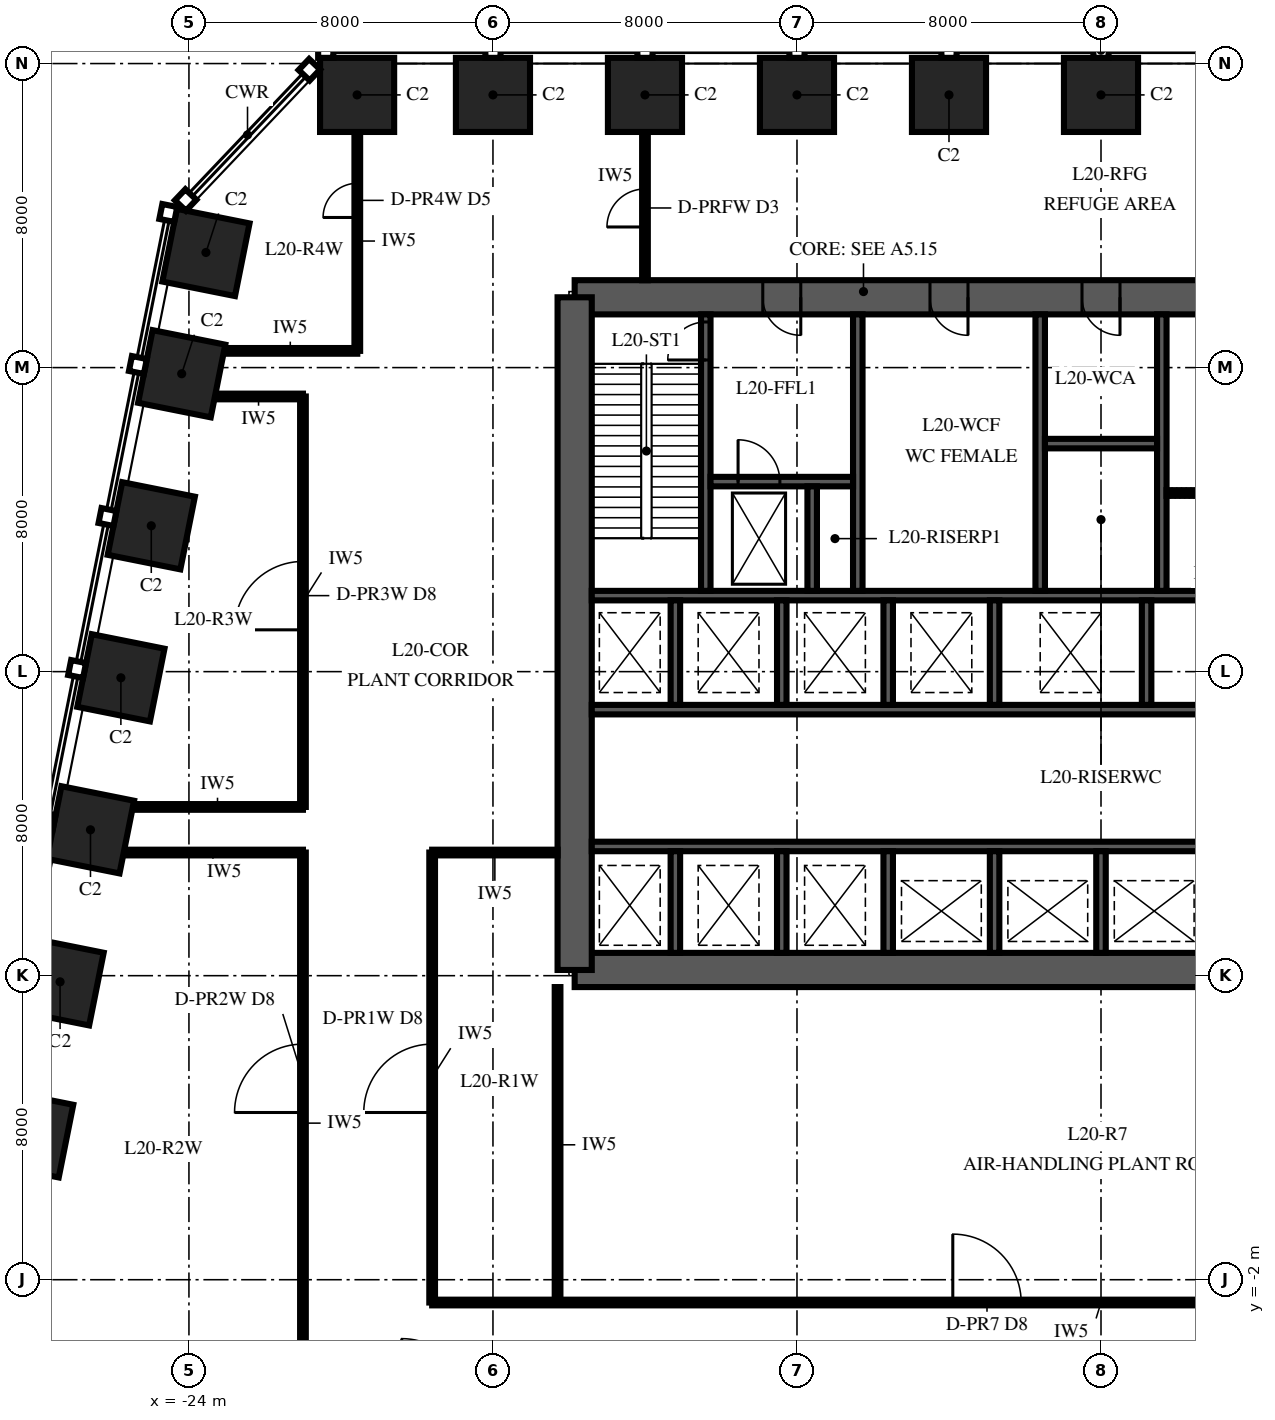
"""IFC4 building model, lengths in metres.
Left out: names, types, materials, properties, quantities, classifications, styles, units other than length and angle.
Written with IfcOpenShell. Run it as: python <this file> out.ifc"""

import sys

from ifc_helpers import new_model, si_unit, direction, frame, frame_2d, origin, origin_2d, place, context, subcontext, project, spatial, polyline, rectangle, outline, extrude, element, fill, save


model = new_model("IFC4")
c1 = context("Model", 3, precision=1e-05, world=origin(), true_north=direction((0.0, 1.0)))
c2 = subcontext(c1, "Body", "Model", "MODEL_VIEW")
j1 = project(units=[si_unit("LENGTHUNIT", "METRE"), si_unit("PLANEANGLEUNIT", "RADIAN")], contexts=[c1])
p1 = place(None, origin())
s1 = spatial("IfcSite", under=j1, at=p1, CompositionType="ELEMENT")
p2 = place(p1, origin())
s2 = spatial("IfcBuilding", under=s1, at=p2, CompositionType="ELEMENT")
p3 = place(p2, frame((0.0, 0.0, 92.0)))
s3 = spatial("IfcBuildingStorey", under=s2, at=p3, CompositionType="ELEMENT", Elevation=92.0)
for number, where, z_axis, x_axis in (
    (1, (0.0, 29.175, 0.0), (0.0, 0.0, 1.0), (-1.0, 0.0, 0.0)),
    (2, (-4.0, 29.175, 0.0), (0.0, 0.0, 1.0), (-1.0, 0.0, 0.0)),
    (3, (-8.0, 29.175, 0.0), (0.0, 0.0, 1.0), (-1.0, 0.0, 0.0)),
    (4, (-12.0, 29.175, 0.0), (0.0, 0.0, 1.0), (-1.0, 0.0, 0.0)),
    (5, (-16.0, 29.175, 0.0), (0.0, 0.0, 1.0), (-1.0, 0.0, 0.0)),
    (6, (-19.575, 29.175, 0.0), (0.0, 0.0, 1.0), (-1.0, 0.0, 0.0)),
    (7, (-23.553, 25.029, 0.0), (0.0, 0.0, 1.0), (-0.196, -0.981, 0.0)),
    (8, (-24.191, 21.838, 0.0), (0.0, 0.0, 1.0), (-0.196, -0.981, 0.0)),
    (9, (-24.991, 17.838, 0.0), (0.0, 0.0, 1.0), (-0.196, -0.981, 0.0)),
    (10, (-25.791, 13.838, 0.0), (0.0, 0.0, 1.0), (-0.196, -0.981, 0.0)),
    (11, (-26.591, 9.838, 0.0), (0.0, 0.0, 1.0), (-0.196, -0.981, 0.0)),
    (12, (-27.391, 5.838, 0.0), (0.0, 0.0, 1.0), (-0.196, -0.981, 0.0)),
    (13, (-28.191, 1.838, 0.0), (0.0, 0.0, 1.0), (-0.196, -0.981, 0.0)),
):
    element("IfcColumn", number, at=place(p3, frame(where, z_axis=z_axis, x_axis=x_axis)), inside=s3, PredefinedType="COLUMN", context=c2, shape_type="SweptSolid", body=[
        extrude(rectangle(XDim=1.95, YDim=1.95, at=origin_2d()), origin(), (0.0, 0.0, 1.0), 6.0),
    ])
p4 = place(p3, frame((-13.85, 6.15, 0.0), z_axis=(0.0, 0.0, 1.0), x_axis=(1.0, 0.0, 0.0)))
e14 = element("IfcWall", 14, at=p4, inside=s3, PredefinedType="SHEAR", context=c2, shape_type="SweptSolid", body=[
    extrude(rectangle(XDim=27.7, YDim=0.9, at=frame_2d((13.85, 0.0))), origin(), (0.0, 0.0, 1.0), 6.0),
])
p5 = place(p3, frame((13.85, 23.85, 0.0), z_axis=(0.0, 0.0, 1.0), x_axis=(-1.0, 0.0, 0.0)))
e15 = element("IfcWall", 15, at=p5, inside=s3, PredefinedType="SHEAR", context=c2, shape_type="SweptSolid", body=[
    extrude(rectangle(XDim=27.7, YDim=0.9, at=frame_2d((13.85, 0.0))), origin(), (0.0, 0.0, 1.0), 6.0),
])
p6 = place(p5, frame((21.75, 0.0, 0.0)))
e16 = element("IfcOpeningElement", 16, at=p6, cuts=e15, PredefinedType="OPENING", context=c2, shape_type="SweptSolid", body=[
    extrude(rectangle(XDim=1.0, YDim=2.1, at=frame_2d((0.5, 1.05))), frame((0.0, 0.465, 0.0), z_axis=(0.0, -1.0, 0.0), x_axis=(1.0, 0.0, 0.0)), (0.0, 0.0, 1.0), 0.93),
])
p7 = place(p5, frame((4.95, 0.0, 0.0)))
e17 = element("IfcOpeningElement", 17, at=p7, cuts=e15, PredefinedType="OPENING", context=c2, shape_type="SweptSolid", body=[
    extrude(rectangle(XDim=1.0, YDim=2.1, at=frame_2d((0.5, 1.05))), frame((0.0, 0.465, 0.0), z_axis=(0.0, -1.0, 0.0), x_axis=(1.0, 0.0, 0.0)), (0.0, 0.0, 1.0), 0.93),
])
p8 = place(p5, frame((17.35, 0.0, 0.0)))
e18 = element("IfcOpeningElement", 18, at=p8, cuts=e15, PredefinedType="OPENING", context=c2, shape_type="SweptSolid", body=[
    extrude(rectangle(XDim=1.0, YDim=2.1, at=frame_2d((0.5, 1.05))), frame((0.0, 0.465, 0.0), z_axis=(0.0, -1.0, 0.0), x_axis=(1.0, 0.0, 0.0)), (0.0, 0.0, 1.0), 0.93),
])
p9 = place(p5, frame((13.35, 0.0, 0.0)))
e19 = element("IfcOpeningElement", 19, at=p9, cuts=e15, PredefinedType="OPENING", context=c2, shape_type="SweptSolid", body=[
    extrude(rectangle(XDim=1.0, YDim=2.1, at=frame_2d((0.5, 1.05))), frame((0.0, 0.465, 0.0), z_axis=(0.0, -1.0, 0.0), x_axis=(1.0, 0.0, 0.0)), (0.0, 0.0, 1.0), 0.93),
])
p10 = place(p5, frame((9.35, 0.0, 0.0)))
e20 = element("IfcOpeningElement", 20, at=p10, cuts=e15, PredefinedType="OPENING", context=c2, shape_type="SweptSolid", body=[
    extrude(rectangle(XDim=1.0, YDim=2.1, at=frame_2d((0.5, 1.05))), frame((0.0, 0.465, 0.0), z_axis=(0.0, -1.0, 0.0), x_axis=(1.0, 0.0, 0.0)), (0.0, 0.0, 1.0), 0.93),
])
p11 = place(p3, frame((-13.85, 23.85, 0.0), z_axis=(0.0, 0.0, 1.0), x_axis=(0.0, -1.0, 0.0)))
e21 = element("IfcWall", 21, at=p11, inside=s3, PredefinedType="SHEAR", context=c2, shape_type="SweptSolid", body=[
    extrude(outline(polyline([(0.0, -0.45), (17.7, -0.45), (17.7, 0.0), (17.25, 0.0), (17.25, 0.45), (0.45, 0.45), (0.45, 0.0), (0.0, 0.0), (0.0, -0.45)])), origin(), (0.0, 0.0, 1.0), 6.0),
])
for number, where, z_axis, x_axis in (
    (22, (-13.4, 9.4, 0.0), (0.0, 0.0, 1.0), (1.0, 0.0, 0.0)),
    (23, (-13.4, 13.0, 0.0), (0.0, 0.0, 1.0), (1.0, 0.0, 0.0)),
    (24, (-13.4, 16.0, 0.0), (0.0, 0.0, 1.0), (1.0, 0.0, 0.0)),
):
    element("IfcWall", number, at=place(p3, frame(where, z_axis=z_axis, x_axis=x_axis)), inside=s3, PredefinedType="SHEAR", context=c2, shape_type="SweptSolid", body=[
        extrude(rectangle(XDim=26.8, YDim=0.25, at=frame_2d((13.4, 0.0))), origin(), (0.0, 0.0, 1.0), 6.0),
    ])
for number, where, z_axis, x_axis in (
    (25, (-11.2, 6.6, 0.0), (0.0, 0.0, 1.0), (0.0, 1.0, 0.0)),
    (26, (-8.4, 6.6, 0.0), (0.0, 0.0, 1.0), (0.0, 1.0, 0.0)),
    (27, (-5.6, 6.6, 0.0), (0.0, 0.0, 1.0), (0.0, 1.0, 0.0)),
    (28, (-2.8, 6.6, 0.0), (0.0, 0.0, 1.0), (0.0, 1.0, 0.0)),
    (29, (0.0, 6.6, 0.0), (0.0, 0.0, 1.0), (0.0, 1.0, 0.0)),
):
    element("IfcWall", number, at=place(p3, frame(where, z_axis=z_axis, x_axis=x_axis)), inside=s3, PredefinedType="SHEAR", context=c2, shape_type="SweptSolid", body=[
        extrude(rectangle(XDim=2.675, YDim=0.25, at=frame_2d((1.337, 0.0))), origin(), (0.0, 0.0, 1.0), 6.0),
    ])
for number, where, z_axis, x_axis in (
    (30, (-11.2, 13.125, 0.0), (0.0, 0.0, 1.0), (0.0, 1.0, 0.0)),
    (31, (-8.4, 13.125, 0.0), (0.0, 0.0, 1.0), (0.0, 1.0, 0.0)),
    (32, (-5.6, 13.125, 0.0), (0.0, 0.0, 1.0), (0.0, 1.0, 0.0)),
    (33, (-2.8, 13.125, 0.0), (0.0, 0.0, 1.0), (0.0, 1.0, 0.0)),
    (34, (1.2, 13.125, 0.0), (0.0, 0.0, 1.0), (0.0, 1.0, 0.0)),
):
    element("IfcWall", number, at=place(p3, frame(where, z_axis=z_axis, x_axis=x_axis)), inside=s3, PredefinedType="SHEAR", context=c2, shape_type="SweptSolid", body=[
        extrude(rectangle(XDim=2.75, YDim=0.25, at=frame_2d((1.375, 0.0))), origin(), (0.0, 0.0, 1.0), 6.0),
    ])
p12 = place(p3, frame((-10.4, 16.125, 0.0), z_axis=(0.0, 0.0, 1.0), x_axis=(0.0, 1.0, 0.0)))
e35 = element("IfcWall", 35, at=p12, inside=s3, PredefinedType="SHEAR", context=c2, shape_type="SweptSolid", body=[
    extrude(rectangle(XDim=7.275, YDim=0.25, at=frame_2d((3.637, 0.0))), origin(), (0.0, 0.0, 1.0), 6.0),
])
p13 = place(p12, frame((6.075, 0.0, 0.0)))
e36 = element("IfcOpeningElement", 36, at=p13, cuts=e35, PredefinedType="OPENING", context=c2, shape_type="SweptSolid", body=[
    extrude(rectangle(XDim=1.0, YDim=2.1, at=frame_2d((0.5, 1.05))), frame((0.0, 0.14, 0.0), z_axis=(0.0, -1.0, 0.0), x_axis=(1.0, 0.0, 0.0)), (0.0, 0.0, 1.0), 0.28),
])
for number, where, z_axis, x_axis in (
    (37, (-6.4, 16.125, 0.0), (0.0, 0.0, 1.0), (0.0, 1.0, 0.0)),
    (38, (-1.6, 16.125, 0.0), (0.0, 0.0, 1.0), (0.0, 1.0, 0.0)),
    (39, (1.6, 16.125, 0.0), (0.0, 0.0, 1.0), (0.0, 1.0, 0.0)),
):
    element("IfcWall", number, at=place(p3, frame(where, z_axis=z_axis, x_axis=x_axis)), inside=s3, PredefinedType="SHEAR", context=c2, shape_type="SweptSolid", body=[
        extrude(rectangle(XDim=7.275, YDim=0.25, at=frame_2d((3.637, 0.0))), origin(), (0.0, 0.0, 1.0), 6.0),
    ])
p14 = place(p3, frame((-10.275, 19.0, 0.0), z_axis=(0.0, 0.0, 1.0), x_axis=(1.0, 0.0, 0.0)))
e40 = element("IfcWall", 40, at=p14, inside=s3, PredefinedType="SHEAR", context=c2, shape_type="SweptSolid", body=[
    extrude(rectangle(XDim=3.75, YDim=0.25, at=frame_2d((1.875, 0.0))), origin(), (0.0, 0.0, 1.0), 6.0),
])
p15 = place(p14, frame((0.725, 0.0, 0.0)))
e41 = element("IfcOpeningElement", 41, at=p15, cuts=e40, PredefinedType="OPENING", context=c2, shape_type="SweptSolid", body=[
    extrude(rectangle(XDim=1.1, YDim=2.1, at=frame_2d((0.55, 1.05))), frame((0.0, 0.14, 0.0), z_axis=(0.0, -1.0, 0.0), x_axis=(1.0, 0.0, 0.0)), (0.0, 0.0, 1.0), 0.28),
])
p16 = place(p3, frame((-7.6, 16.125, 0.0), z_axis=(0.0, 0.0, 1.0), x_axis=(0.0, 1.0, 0.0)))
e42 = element("IfcWall", 42, at=p16, inside=s3, PredefinedType="SHEAR", context=c2, shape_type="SweptSolid", body=[
    extrude(rectangle(XDim=2.75, YDim=0.25, at=frame_2d((1.375, 0.0))), origin(), (0.0, 0.0, 1.0), 6.0),
])
p17 = place(p3, frame((-1.475, 20.0, 0.0), z_axis=(0.0, 0.0, 1.0), x_axis=(1.0, 0.0, 0.0)))
e43 = element("IfcWall", 43, at=p17, inside=s3, PredefinedType="SHEAR", context=c2, shape_type="SweptSolid", body=[
    extrude(rectangle(XDim=2.95, YDim=0.25, at=frame_2d((1.475, 0.0))), origin(), (0.0, 0.0, 1.0), 6.0),
])
p18 = place(p3, frame((1.725, 18.7, 0.0), z_axis=(0.0, 0.0, 1.0), x_axis=(1.0, 0.0, 0.0)))
e44 = element("IfcWall", 44, at=p18, inside=s3, PredefinedType="PARTITIONING", context=c2, shape_type="SweptSolid", body=[
    extrude(rectangle(XDim=4.55, YDim=0.15, at=frame_2d((2.275, 0.0))), origin(), (0.0, 0.0, 1.0), 5.85),
])
p19 = place(p18, frame((1.825, 0.0, 0.0)))
e45 = element("IfcOpeningElement", 45, at=p19, cuts=e44, PredefinedType="OPENING", context=c2, shape_type="SweptSolid", body=[
    extrude(rectangle(XDim=0.9, YDim=2.1, at=frame_2d((0.45, 1.05))), frame((0.0, 0.09, 0.0), z_axis=(0.0, -1.0, 0.0), x_axis=(1.0, 0.0, 0.0)), (0.0, 0.0, 1.0), 0.18),
])
p20 = place(p3, frame((-17.6, -2.6, 0.0), z_axis=(0.0, 0.0, 1.0), x_axis=(0.0, 1.0, 0.0)))
e46 = element("IfcWall", 46, at=p20, inside=s3, PredefinedType="PARTITIONING", context=c2, shape_type="SweptSolid", body=[
    extrude(rectangle(XDim=11.84, YDim=0.15, at=frame_2d((5.92, 0.0))), origin(), (0.0, 0.0, 1.0), 5.8),
])
p21 = place(p20, frame((5.0, 0.0, 0.0)))
e47 = element("IfcOpeningElement", 47, at=p21, cuts=e46, PredefinedType="OPENING", context=c2, shape_type="SweptSolid", body=[
    extrude(rectangle(XDim=1.8, YDim=2.4, at=frame_2d((0.9, 1.2))), frame((0.0, 0.09, 0.0), z_axis=(0.0, -1.0, 0.0), x_axis=(1.0, 0.0, 0.0)), (0.0, 0.0, 1.0), 0.18),
])
p22 = place(p3, frame((-21.0, -5.0, 0.0), z_axis=(0.0, 0.0, 1.0), x_axis=(0.0, 1.0, 0.0)))
e48 = element("IfcWall", 48, at=p22, inside=s3, PredefinedType="PARTITIONING", context=c2, shape_type="SweptSolid", body=[
    extrude(rectangle(XDim=14.24, YDim=0.15, at=frame_2d((7.12, 0.0))), origin(), (0.0, 0.0, 1.0), 5.8),
])
p23 = place(p22, frame((7.4, 0.0, 0.0)))
e49 = element("IfcOpeningElement", 49, at=p23, cuts=e48, PredefinedType="OPENING", context=c2, shape_type="SweptSolid", body=[
    extrude(rectangle(XDim=1.8, YDim=2.4, at=frame_2d((0.9, 1.2))), frame((0.0, 0.09, 0.0), z_axis=(0.0, -1.0, 0.0), x_axis=(1.0, 0.0, 0.0)), (0.0, 0.0, 1.0), 0.18),
])
p24 = place(p3, frame((-21.0, 10.44, 0.0), z_axis=(0.0, 0.0, 1.0), x_axis=(0.0, 1.0, 0.0)))
e50 = element("IfcWall", 50, at=p24, inside=s3, PredefinedType="PARTITIONING", context=c2, shape_type="SweptSolid", body=[
    extrude(rectangle(XDim=10.8, YDim=0.15, at=frame_2d((5.4, 0.0))), origin(), (0.0, 0.0, 1.0), 5.8),
])
p25 = place(p24, frame((4.66, 0.0, 0.0)))
e51 = element("IfcOpeningElement", 51, at=p25, cuts=e50, PredefinedType="OPENING", context=c2, shape_type="SweptSolid", body=[
    extrude(rectangle(XDim=1.8, YDim=2.4, at=frame_2d((0.9, 1.2))), frame((0.0, 0.09, 0.0), z_axis=(0.0, -1.0, 0.0), x_axis=(1.0, 0.0, 0.0)), (0.0, 0.0, 1.0), 0.18),
])
p26 = place(p3, frame((-14.3, -2.6, 0.0), z_axis=(0.0, 0.0, 1.0), x_axis=(0.0, 1.0, 0.0)))
e52 = element("IfcWall", 52, at=p26, inside=s3, PredefinedType="PARTITIONING", context=c2, shape_type="SweptSolid", body=[
    extrude(rectangle(XDim=8.3, YDim=0.15, at=frame_2d((4.15, 0.0))), origin(), (0.0, 0.0, 1.0), 5.8),
])
p27 = place(p3, frame((-14.3, 9.24, 0.0), z_axis=(0.0, 0.0, 1.0), x_axis=(-1.0, 0.0, 0.0)))
e53 = element("IfcWall", 53, at=p27, inside=s3, PredefinedType="PARTITIONING", context=c2, shape_type="SweptSolid", body=[
    extrude(rectangle(XDim=3.3, YDim=0.15, at=frame_2d((1.65, 0.0))), origin(), (0.0, 0.0, 1.0), 5.179),
])
p28 = place(p3, frame((-21.0, 9.24, 0.0), z_axis=(0.0, 0.0, 1.0), x_axis=(-1.0, 0.0, 0.0)))
e54 = element("IfcWall", 54, at=p28, inside=s3, PredefinedType="PARTITIONING", context=c2, shape_type="SweptSolid", body=[
    extrude(rectangle(XDim=4.737, YDim=0.15, at=frame_2d((2.368, 0.0))), origin(), (0.0, 0.0, 1.0), 5.8),
])
p29 = place(p3, frame((-21.0, 10.44, 0.0), z_axis=(0.0, 0.0, 1.0), x_axis=(-1.0, 0.0, 0.0)))
e55 = element("IfcWall", 55, at=p29, inside=s3, PredefinedType="PARTITIONING", context=c2, shape_type="SweptSolid", body=[
    extrude(rectangle(XDim=4.497, YDim=0.15, at=frame_2d((2.248, 0.0))), origin(), (0.0, 0.0, 1.0), 5.8),
])
p30 = place(p3, frame((-21.0, 21.24, 0.0), z_axis=(0.0, 0.0, 1.0), x_axis=(-1.0, 0.0, 0.0)))
e56 = element("IfcWall", 56, at=p30, inside=s3, PredefinedType="PARTITIONING", context=c2, shape_type="SweptSolid", body=[
    extrude(rectangle(XDim=2.337, YDim=0.15, at=frame_2d((1.168, 0.0))), origin(), (0.0, 0.0, 1.0), 5.8),
])
p31 = place(p3, frame((-19.57, 22.44, 0.0), z_axis=(0.0, 0.0, 1.0), x_axis=(-1.0, 0.0, 0.0)))
e57 = element("IfcWall", 57, at=p31, inside=s3, PredefinedType="PARTITIONING", context=c2, shape_type="SweptSolid", body=[
    extrude(rectangle(XDim=3.527, YDim=0.15, at=frame_2d((1.763, 0.0))), origin(), (0.0, 0.0, 1.0), 5.8),
])
p32 = place(p3, frame((-19.57, 22.44, 0.0), z_axis=(0.0, 0.0, 1.0), x_axis=(0.0, 1.0, 0.0)))
e58 = element("IfcWall", 58, at=p32, inside=s3, PredefinedType="PARTITIONING", context=c2, shape_type="SweptSolid", body=[
    extrude(rectangle(XDim=5.78, YDim=0.15, at=frame_2d((2.89, 0.0))), origin(), (0.0, 0.0, 1.0), 5.368),
])
p33 = place(p32, frame((3.51, 0.0, 0.0)))
e59 = element("IfcOpeningElement", 59, at=p33, cuts=e58, PredefinedType="OPENING", context=c2, shape_type="SweptSolid", body=[
    extrude(rectangle(XDim=0.9, YDim=2.1, at=frame_2d((0.45, 1.05))), frame((0.0, 0.09, 0.0), z_axis=(0.0, -1.0, 0.0), x_axis=(1.0, 0.0, 0.0)), (0.0, 0.0, 1.0), 0.18),
])
p34 = place(p3, frame((-12.0, 24.3, 0.0), z_axis=(0.0, 0.0, 1.0), x_axis=(0.0, 1.0, 0.0)))
e60 = element("IfcWall", 60, at=p34, inside=s3, PredefinedType="PARTITIONING", context=c2, shape_type="SweptSolid", body=[
    extrude(rectangle(XDim=3.92, YDim=0.15, at=frame_2d((1.96, 0.0))), origin(), (0.0, 0.0, 1.0), 5.8),
])
p35 = place(p34, frame((1.4, 0.0, 0.0)))
e61 = element("IfcOpeningElement", 61, at=p35, cuts=e60, PredefinedType="OPENING", context=c2, shape_type="SweptSolid", body=[
    extrude(rectangle(XDim=1.0, YDim=2.1, at=frame_2d((0.5, 1.05))), frame((0.0, 0.09, 0.0), z_axis=(0.0, -1.0, 0.0), x_axis=(1.0, 0.0, 0.0)), (0.0, 0.0, 1.0), 0.18),
])
p36 = place(p3, frame((-17.6, -2.6, 0.0), z_axis=(0.0, 0.0, 1.0), x_axis=(1.0, 0.0, 0.0)))
e62 = element("IfcWall", 62, at=p36, inside=s3, PredefinedType="PARTITIONING", context=c2, shape_type="SweptSolid", body=[
    extrude(rectangle(XDim=35.2, YDim=0.15, at=frame_2d((17.6, 0.0))), origin(), (0.0, 0.0, 1.0), 5.8),
])
p37 = place(p36, frame((13.7, 0.0, 0.0)))
e63 = element("IfcOpeningElement", 63, at=p37, cuts=e62, PredefinedType="OPENING", context=c2, shape_type="SweptSolid", body=[
    extrude(rectangle(XDim=1.8, YDim=2.4, at=frame_2d((0.9, 1.2))), frame((0.0, 0.09, 0.0), z_axis=(0.0, -1.0, 0.0), x_axis=(1.0, 0.0, 0.0)), (0.0, 0.0, 1.0), 0.18),
])
p38 = place(p6, origin())
e64 = element("IfcDoor", 64, at=p38, inside=s3, OperationType="SINGLE_SWING_RIGHT", PredefinedType="DOOR", context=c2, shape_type="SweptSolid", body=[
    extrude(rectangle(XDim=1.0, YDim=2.1, at=frame_2d((0.5, 1.05))), frame((0.0, 0.45, 0.0), z_axis=(0.0, -1.0, 0.0), x_axis=(1.0, 0.0, 0.0)), (0.0, 0.0, 1.0), 0.899),
])
fill(e16, e64)
p39 = place(p8, origin())
e65 = element("IfcDoor", 65, at=p39, inside=s3, OperationType="SINGLE_SWING_LEFT", PredefinedType="DOOR", context=c2, shape_type="SweptSolid", body=[
    extrude(rectangle(XDim=1.0, YDim=2.1, at=frame_2d((0.5, 1.05))), frame((0.0, 0.45, 0.0), z_axis=(0.0, -1.0, 0.0), x_axis=(1.0, 0.0, 0.0)), (0.0, 0.0, 1.0), 0.899),
])
fill(e18, e65)
p40 = place(p9, origin())
e66 = element("IfcDoor", 66, at=p40, inside=s3, OperationType="SINGLE_SWING_LEFT", PredefinedType="DOOR", context=c2, shape_type="SweptSolid", body=[
    extrude(rectangle(XDim=1.0, YDim=2.1, at=frame_2d((0.5, 1.05))), frame((0.0, 0.45, 0.0), z_axis=(0.0, -1.0, 0.0), x_axis=(1.0, 0.0, 0.0)), (0.0, 0.0, 1.0), 0.899),
])
fill(e19, e66)
p41 = place(p13, origin())
e67 = element("IfcDoor", 67, at=p41, inside=s3, OperationType="SINGLE_SWING_LEFT", PredefinedType="DOOR", context=c2, shape_type="SweptSolid", body=[
    extrude(rectangle(XDim=1.0, YDim=2.1, at=frame_2d((0.5, 1.05))), frame((0.0, 0.125, 0.0), z_axis=(0.0, -1.0, 0.0), x_axis=(1.0, 0.0, 0.0)), (0.0, 0.0, 1.0), 0.25),
])
fill(e36, e67)
p42 = place(p15, origin())
e68 = element("IfcDoor", 68, at=p42, inside=s3, OperationType="SLIDING_TO_RIGHT", PredefinedType="DOOR", context=c2, shape_type="SweptSolid", body=[
    extrude(rectangle(XDim=1.1, YDim=2.1, at=frame_2d((0.55, 1.05))), frame((0.0, 0.125, 0.0), z_axis=(0.0, -1.0, 0.0), x_axis=(1.0, 0.0, 0.0)), (0.0, 0.0, 1.0), 0.25),
])
fill(e41, e68)
p43 = place(p21, origin())
e69 = element("IfcDoor", 69, at=p43, inside=s3, OperationType="DOUBLE_DOOR_SINGLE_SWING", PredefinedType="DOOR", context=c2, shape_type="SweptSolid", body=[
    extrude(rectangle(XDim=1.8, YDim=2.4, at=frame_2d((0.9, 1.2))), frame((0.0, 0.075, 0.0), z_axis=(0.0, -1.0, 0.0), x_axis=(1.0, 0.0, 0.0)), (0.0, 0.0, 1.0), 0.149),
])
fill(e47, e69)
p44 = place(p23, origin())
e70 = element("IfcDoor", 70, at=p44, inside=s3, OperationType="DOUBLE_DOOR_SINGLE_SWING", PredefinedType="DOOR", context=c2, shape_type="SweptSolid", body=[
    extrude(rectangle(XDim=1.8, YDim=2.4, at=frame_2d((0.9, 1.2))), frame((0.0, 0.075, 0.0), z_axis=(0.0, -1.0, 0.0), x_axis=(1.0, 0.0, 0.0)), (0.0, 0.0, 1.0), 0.149),
])
fill(e49, e70)
p45 = place(p25, origin())
e71 = element("IfcDoor", 71, at=p45, inside=s3, OperationType="DOUBLE_DOOR_SINGLE_SWING", PredefinedType="DOOR", context=c2, shape_type="SweptSolid", body=[
    extrude(rectangle(XDim=1.8, YDim=2.4, at=frame_2d((0.9, 1.2))), frame((0.0, 0.075, 0.0), z_axis=(0.0, -1.0, 0.0), x_axis=(1.0, 0.0, 0.0)), (0.0, 0.0, 1.0), 0.149),
])
fill(e51, e71)
p46 = place(p33, origin())
e72 = element("IfcDoor", 72, at=p46, inside=s3, OperationType="SINGLE_SWING_LEFT", PredefinedType="DOOR", context=c2, shape_type="SweptSolid", body=[
    extrude(rectangle(XDim=0.9, YDim=2.1, at=frame_2d((0.45, 1.05))), frame((0.0, 0.075, 0.0), z_axis=(0.0, -1.0, 0.0), x_axis=(1.0, 0.0, 0.0)), (0.0, 0.0, 1.0), 0.149),
])
fill(e59, e72)
p47 = place(p35, origin())
e73 = element("IfcDoor", 73, at=p47, inside=s3, OperationType="SINGLE_SWING_RIGHT", PredefinedType="DOOR", context=c2, shape_type="SweptSolid", body=[
    extrude(rectangle(XDim=1.0, YDim=2.1, at=frame_2d((0.5, 1.05))), frame((0.0, 0.075, 0.0), z_axis=(0.0, -1.0, 0.0), x_axis=(1.0, 0.0, 0.0)), (0.0, 0.0, 1.0), 0.149),
])
fill(e61, e73)
p48 = place(p37, origin())
e74 = element("IfcDoor", 74, at=p48, inside=s3, OperationType="DOUBLE_DOOR_SINGLE_SWING", PredefinedType="DOOR", context=c2, shape_type="SweptSolid", body=[
    extrude(rectangle(XDim=1.8, YDim=2.4, at=frame_2d((0.9, 1.2))), frame((0.0, 0.075, 0.0), z_axis=(0.0, -1.0, 0.0), x_axis=(1.0, 0.0, 0.0)), (0.0, 0.0, 1.0), 0.149),
])
fill(e63, e74)
save(model, sys.argv[1])
